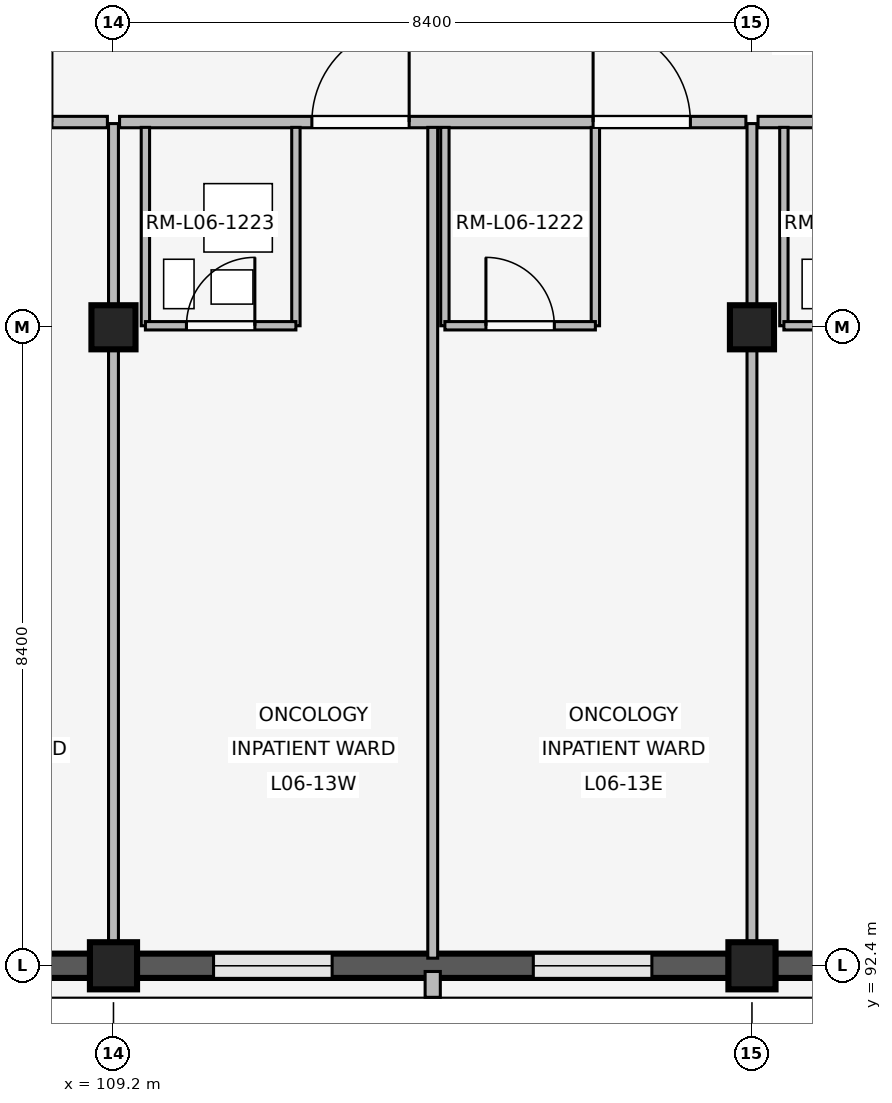
"""IFC4 building model, lengths in metres.
Left out: names, types, materials, properties, quantities, classifications, styles, units other than length and angle.
Written with IfcOpenShell. Run it as: python <this file> out.ifc"""

import sys

from ifc_helpers import new_model, si_unit, direction, frame, frame_2d, origin, origin_2d, place, context, subcontext, project, spatial, rectangle, extrude, element, fill, save


model = new_model("IFC4")
c1 = context("Model", 3, precision=1e-05, world=origin(), true_north=direction((0.0, 1.0)))
c2 = subcontext(c1, "Body", "Model", "MODEL_VIEW")
j1 = project(units=[si_unit("LENGTHUNIT", "METRE"), si_unit("PLANEANGLEUNIT", "RADIAN")], contexts=[c1])
p1 = place(None, origin())
s1 = spatial("IfcSite", under=j1, at=p1, CompositionType="ELEMENT")
p2 = place(p1, origin())
s2 = spatial("IfcBuilding", under=s1, at=p2, CompositionType="ELEMENT")
p3 = place(p2, frame((0.0, 0.0, 24.6)))
s3 = spatial("IfcBuildingStorey", under=s2, at=p3, CompositionType="ELEMENT", Elevation=24.6)
p4 = place(p3, frame((109.2, 92.4, 0.0), z_axis=(0.0, 0.0, 1.0), x_axis=(1.0, 0.0, 0.0)))
e1 = element("IfcColumn", 1, at=p4, inside=s3, PredefinedType="COLUMN", context=c2, shape_type="SweptSolid", body=[
    extrude(rectangle(XDim=0.62, YDim=0.62, at=origin_2d()), origin(), (0.0, 0.0, 1.0), 4.2),
])
p5 = place(p3, frame((109.2, 100.8, 0.0), z_axis=(0.0, 0.0, 1.0), x_axis=(1.0, 0.0, 0.0)))
e2 = element("IfcColumn", 2, at=p5, inside=s3, PredefinedType="COLUMN", context=c2, shape_type="SweptSolid", body=[
    extrude(rectangle(XDim=0.58, YDim=0.58, at=origin_2d()), origin(), (0.0, 0.0, 1.0), 4.2),
])
p6 = place(p3, frame((117.6, 92.4, 0.0), z_axis=(0.0, 0.0, 1.0), x_axis=(1.0, 0.0, 0.0)))
e3 = element("IfcColumn", 3, at=p6, inside=s3, PredefinedType="COLUMN", context=c2, shape_type="SweptSolid", body=[
    extrude(rectangle(XDim=0.62, YDim=0.62, at=origin_2d()), origin(), (0.0, 0.0, 1.0), 4.2),
])
p7 = place(p3, frame((117.6, 100.8, 0.0), z_axis=(0.0, 0.0, 1.0), x_axis=(1.0, 0.0, 0.0)))
e4 = element("IfcColumn", 4, at=p7, inside=s3, PredefinedType="COLUMN", context=c2, shape_type="SweptSolid", body=[
    extrude(rectangle(XDim=0.58, YDim=0.58, at=origin_2d()), origin(), (0.0, 0.0, 1.0), 4.2),
])
p8 = place(p3, frame((108.895, 92.4, 0.0), z_axis=(0.0, 0.0, 1.0), x_axis=(-1.0, 0.0, 0.0)))
e5 = element("IfcWall", 5, at=p8, inside=s3, PredefinedType="SOLIDWALL", context=c2, shape_type="SweptSolid", body=[
    extrude(rectangle(XDim=7.79, YDim=0.32, at=frame_2d((3.895, 0.0))), origin(), (0.0, 0.0, 1.0), 3.34),
])
p9 = place(p8, frame((1.102, 0.0, 0.85)))
e6 = element("IfcOpeningElement", 6, at=p9, cuts=e5, PredefinedType="OPENING", context=c2, shape_type="SweptSolid", body=[
    extrude(rectangle(XDim=1.38, YDim=1.5, at=frame_2d((0.69, 0.75))), frame((0.0, 0.17, 0.0), z_axis=(0.0, -1.0, 0.0), x_axis=(1.0, 0.0, 0.0)), (0.0, 0.0, 1.0), 0.34),
])
p10 = place(p8, frame((5.308, 0.0, 0.85)))
e7 = element("IfcOpeningElement", 7, at=p10, cuts=e5, PredefinedType="OPENING", context=c2, shape_type="SweptSolid", body=[
    extrude(rectangle(XDim=1.38, YDim=1.5, at=frame_2d((0.69, 0.75))), frame((0.0, 0.17, 0.0), z_axis=(0.0, -1.0, 0.0), x_axis=(1.0, 0.0, 0.0)), (0.0, 0.0, 1.0), 0.34),
])
p11 = place(p3, frame((117.295, 92.4, 0.0), z_axis=(0.0, 0.0, 1.0), x_axis=(-1.0, 0.0, 0.0)))
e8 = element("IfcWall", 8, at=p11, inside=s3, PredefinedType="SOLIDWALL", context=c2, shape_type="SweptSolid", body=[
    extrude(rectangle(XDim=7.79, YDim=0.32, at=frame_2d((3.895, 0.0))), origin(), (0.0, 0.0, 1.0), 3.34),
])
p12 = place(p11, frame((1.012, 0.0, 0.85)))
e9 = element("IfcOpeningElement", 9, at=p12, cuts=e8, PredefinedType="OPENING", context=c2, shape_type="SweptSolid", body=[
    extrude(rectangle(XDim=1.56, YDim=1.7, at=frame_2d((0.78, 0.85))), frame((0.0, 0.17, 0.0), z_axis=(0.0, -1.0, 0.0), x_axis=(1.0, 0.0, 0.0)), (0.0, 0.0, 1.0), 0.34),
])
p13 = place(p11, frame((5.218, 0.0, 0.85)))
e10 = element("IfcOpeningElement", 10, at=p13, cuts=e8, PredefinedType="OPENING", context=c2, shape_type="SweptSolid", body=[
    extrude(rectangle(XDim=1.56, YDim=1.7, at=frame_2d((0.78, 0.85))), frame((0.0, 0.17, 0.0), z_axis=(0.0, -1.0, 0.0), x_axis=(1.0, 0.0, 0.0)), (0.0, 0.0, 1.0), 0.34),
])
p14 = place(p3, frame((113.4, 92.325, 0.0), z_axis=(0.0, 0.0, 1.0), x_axis=(0.0, -1.0, 0.0)))
e11 = element("IfcWall", 11, at=p14, inside=s3, PredefinedType="ELEMENTEDWALL", context=c2, shape_type="SweptSolid", body=[
    extrude(rectangle(XDim=0.34, YDim=0.2, at=frame_2d((0.17, 0.0))), origin(), (0.0, 0.0, 1.0), 3.32),
])
p15 = place(p3, frame((125.695, 92.4, 0.0), z_axis=(0.0, 0.0, 1.0), x_axis=(-1.0, 0.0, 0.0)))
e12 = element("IfcWall", 12, at=p15, inside=s3, PredefinedType="SOLIDWALL", context=c2, shape_type="SweptSolid", body=[
    extrude(rectangle(XDim=7.79, YDim=0.32, at=frame_2d((3.895, 0.0))), origin(), (0.0, 0.0, 1.0), 3.34),
])
p16 = place(p15, frame((0.982, 0.0, 0.85)))
e13 = element("IfcOpeningElement", 13, at=p16, cuts=e12, PredefinedType="OPENING", context=c2, shape_type="SweptSolid", body=[
    extrude(rectangle(XDim=1.62, YDim=1.8, at=frame_2d((0.81, 0.9))), frame((0.0, 0.17, 0.0), z_axis=(0.0, -1.0, 0.0), x_axis=(1.0, 0.0, 0.0)), (0.0, 0.0, 1.0), 0.34),
])
p17 = place(p15, frame((5.188, 0.0, 0.85)))
e14 = element("IfcOpeningElement", 14, at=p17, cuts=e12, PredefinedType="OPENING", context=c2, shape_type="SweptSolid", body=[
    extrude(rectangle(XDim=1.62, YDim=1.8, at=frame_2d((0.81, 0.9))), frame((0.0, 0.17, 0.0), z_axis=(0.0, -1.0, 0.0), x_axis=(1.0, 0.0, 0.0)), (0.0, 0.0, 1.0), 0.34),
])
p18 = place(p3, frame((100.88, 103.5, 0.0), z_axis=(0.0, 0.0, 1.0), x_axis=(1.0, 0.0, 0.0)))
e15 = element("IfcWall", 15, at=p18, inside=s3, PredefinedType="PARTITIONING", context=c2, shape_type="SweptSolid", body=[
    extrude(rectangle(XDim=8.24, YDim=0.15, at=frame_2d((4.12, 0.0))), origin(), (0.0, 0.0, 1.0), 3.32),
])
p19 = place(p18, frame((2.53, 0.0, 0.0)))
e16 = element("IfcOpeningElement", 16, at=p19, cuts=e15, PredefinedType="OPENING", context=c2, shape_type="SweptSolid", body=[
    extrude(rectangle(XDim=1.28, YDim=2.2, at=frame_2d((0.64, 1.1))), frame((0.0, 0.085, 0.0), z_axis=(0.0, -1.0, 0.0), x_axis=(1.0, 0.0, 0.0)), (0.0, 0.0, 1.0), 0.17),
])
p20 = place(p18, frame((6.23, 0.0, 0.0)))
e17 = element("IfcOpeningElement", 17, at=p20, cuts=e15, PredefinedType="OPENING", context=c2, shape_type="SweptSolid", body=[
    extrude(rectangle(XDim=1.28, YDim=2.2, at=frame_2d((0.64, 1.1))), frame((0.0, 0.085, 0.0), z_axis=(0.0, -1.0, 0.0), x_axis=(1.0, 0.0, 0.0)), (0.0, 0.0, 1.0), 0.17),
])
p21 = place(p3, frame((109.2, 92.54, 0.0), z_axis=(0.0, 0.0, 1.0), x_axis=(0.0, 1.0, 0.0)))
e18 = element("IfcWall", 18, at=p21, inside=s3, PredefinedType="PARTITIONING", context=c2, shape_type="SweptSolid", body=[
    extrude(rectangle(XDim=10.94, YDim=0.13, at=frame_2d((5.47, 0.0))), origin(), (0.0, 0.0, 1.0), 3.32),
])
p22 = place(p3, frame((109.28, 103.5, 0.0), z_axis=(0.0, 0.0, 1.0), x_axis=(1.0, 0.0, 0.0)))
e19 = element("IfcWall", 19, at=p22, inside=s3, PredefinedType="PARTITIONING", context=c2, shape_type="SweptSolid", body=[
    extrude(rectangle(XDim=8.24, YDim=0.15, at=frame_2d((4.12, 0.0))), origin(), (0.0, 0.0, 1.0), 3.32),
])
p23 = place(p22, frame((2.53, 0.0, 0.0)))
e20 = element("IfcOpeningElement", 20, at=p23, cuts=e19, PredefinedType="OPENING", context=c2, shape_type="SweptSolid", body=[
    extrude(rectangle(XDim=1.28, YDim=2.2, at=frame_2d((0.64, 1.1))), frame((0.0, 0.085, 0.0), z_axis=(0.0, -1.0, 0.0), x_axis=(1.0, 0.0, 0.0)), (0.0, 0.0, 1.0), 0.17),
])
p24 = place(p22, frame((6.23, 0.0, 0.0)))
e21 = element("IfcOpeningElement", 21, at=p24, cuts=e19, PredefinedType="OPENING", context=c2, shape_type="SweptSolid", body=[
    extrude(rectangle(XDim=1.28, YDim=2.2, at=frame_2d((0.64, 1.1))), frame((0.0, 0.085, 0.0), z_axis=(0.0, -1.0, 0.0), x_axis=(1.0, 0.0, 0.0)), (0.0, 0.0, 1.0), 0.17),
])
p25 = place(p3, frame((113.4, 92.5, 0.0), z_axis=(0.0, 0.0, 1.0), x_axis=(0.0, 1.0, 0.0)))
e22 = element("IfcWall", 22, at=p25, inside=s3, PredefinedType="PARTITIONING", context=c2, shape_type="SweptSolid", body=[
    extrude(rectangle(XDim=10.93, YDim=0.13, at=frame_2d((5.465, 0.0))), origin(), (0.0, 0.0, 1.0), 3.32),
])
for number, where, z_axis, x_axis in (
    (23, (109.62, 100.82, 0.0), (0.0, 0.0, 1.0), (0.0, 1.0, 0.0)),
    (24, (111.6, 100.82, 0.0), (0.0, 0.0, 1.0), (0.0, 1.0, 0.0)),
):
    element("IfcWall", number, at=place(p3, frame(where, z_axis=z_axis, x_axis=x_axis)), inside=s3, PredefinedType="PARTITIONING", context=c2, shape_type="SweptSolid", body=[
        extrude(rectangle(XDim=2.61, YDim=0.11, at=frame_2d((1.305, 0.0))), origin(), (0.0, 0.0, 1.0), 3.32),
    ])
p26 = place(p3, frame((109.62, 100.82, 0.0), z_axis=(0.0, 0.0, 1.0), x_axis=(1.0, 0.0, 0.0)))
e25 = element("IfcWall", 25, at=p26, inside=s3, PredefinedType="PARTITIONING", context=c2, shape_type="SweptSolid", body=[
    extrude(rectangle(XDim=1.98, YDim=0.11, at=frame_2d((0.99, 0.0))), origin(), (0.0, 0.0, 1.0), 3.32),
])
p27 = place(p26, frame((0.54, 0.0, 0.0)))
e26 = element("IfcOpeningElement", 26, at=p27, cuts=e25, PredefinedType="OPENING", context=c2, shape_type="SweptSolid", body=[
    extrude(rectangle(XDim=0.9, YDim=2.1, at=frame_2d((0.45, 1.05))), frame((0.0, 0.065, 0.0), z_axis=(0.0, -1.0, 0.0), x_axis=(1.0, 0.0, 0.0)), (0.0, 0.0, 1.0), 0.13),
])
for number, where, z_axis, x_axis in (
    (27, (113.56, 100.82, 0.0), (0.0, 0.0, 1.0), (0.0, 1.0, 0.0)),
    (28, (115.54, 100.82, 0.0), (0.0, 0.0, 1.0), (0.0, 1.0, 0.0)),
):
    element("IfcWall", number, at=place(p3, frame(where, z_axis=z_axis, x_axis=x_axis)), inside=s3, PredefinedType="PARTITIONING", context=c2, shape_type="SweptSolid", body=[
        extrude(rectangle(XDim=2.61, YDim=0.11, at=frame_2d((1.305, 0.0))), origin(), (0.0, 0.0, 1.0), 3.32),
    ])
p28 = place(p3, frame((113.56, 100.82, 0.0), z_axis=(0.0, 0.0, 1.0), x_axis=(1.0, 0.0, 0.0)))
e29 = element("IfcWall", 29, at=p28, inside=s3, PredefinedType="PARTITIONING", context=c2, shape_type="SweptSolid", body=[
    extrude(rectangle(XDim=1.98, YDim=0.11, at=frame_2d((0.99, 0.0))), origin(), (0.0, 0.0, 1.0), 3.32),
])
p29 = place(p28, frame((0.54, 0.0, 0.0)))
e30 = element("IfcOpeningElement", 30, at=p29, cuts=e29, PredefinedType="OPENING", context=c2, shape_type="SweptSolid", body=[
    extrude(rectangle(XDim=0.9, YDim=2.1, at=frame_2d((0.45, 1.05))), frame((0.0, 0.065, 0.0), z_axis=(0.0, -1.0, 0.0), x_axis=(1.0, 0.0, 0.0)), (0.0, 0.0, 1.0), 0.13),
])
p30 = place(p3, frame((117.6, 92.54, 0.0), z_axis=(0.0, 0.0, 1.0), x_axis=(0.0, 1.0, 0.0)))
e31 = element("IfcWall", 31, at=p30, inside=s3, PredefinedType="PARTITIONING", context=c2, shape_type="SweptSolid", body=[
    extrude(rectangle(XDim=10.94, YDim=0.13, at=frame_2d((5.47, 0.0))), origin(), (0.0, 0.0, 1.0), 3.32),
])
p31 = place(p3, frame((117.68, 103.5, 0.0), z_axis=(0.0, 0.0, 1.0), x_axis=(1.0, 0.0, 0.0)))
e32 = element("IfcWall", 32, at=p31, inside=s3, PredefinedType="PARTITIONING", context=c2, shape_type="SweptSolid", body=[
    extrude(rectangle(XDim=8.24, YDim=0.15, at=frame_2d((4.12, 0.0))), origin(), (0.0, 0.0, 1.0), 3.32),
])
p32 = place(p31, frame((2.53, 0.0, 0.0)))
e33 = element("IfcOpeningElement", 33, at=p32, cuts=e32, PredefinedType="OPENING", context=c2, shape_type="SweptSolid", body=[
    extrude(rectangle(XDim=1.35, YDim=2.25, at=frame_2d((0.675, 1.125))), frame((0.0, 0.085, 0.0), z_axis=(0.0, -1.0, 0.0), x_axis=(1.0, 0.0, 0.0)), (0.0, 0.0, 1.0), 0.17),
])
p33 = place(p31, frame((6.23, 0.0, 0.0)))
e34 = element("IfcOpeningElement", 34, at=p33, cuts=e32, PredefinedType="OPENING", context=c2, shape_type="SweptSolid", body=[
    extrude(rectangle(XDim=1.35, YDim=2.25, at=frame_2d((0.675, 1.125))), frame((0.0, 0.085, 0.0), z_axis=(0.0, -1.0, 0.0), x_axis=(1.0, 0.0, 0.0)), (0.0, 0.0, 1.0), 0.17),
])
p34 = place(p3, frame((118.02, 100.82, 0.0), z_axis=(0.0, 0.0, 1.0), x_axis=(0.0, 1.0, 0.0)))
e35 = element("IfcWall", 35, at=p34, inside=s3, PredefinedType="PARTITIONING", context=c2, shape_type="SweptSolid", body=[
    extrude(rectangle(XDim=2.61, YDim=0.11, at=frame_2d((1.305, 0.0))), origin(), (0.0, 0.0, 1.0), 3.32),
])
p35 = place(p3, frame((118.02, 100.82, 0.0), z_axis=(0.0, 0.0, 1.0), x_axis=(1.0, 0.0, 0.0)))
e36 = element("IfcWall", 36, at=p35, inside=s3, PredefinedType="PARTITIONING", context=c2, shape_type="SweptSolid", body=[
    extrude(rectangle(XDim=1.98, YDim=0.11, at=frame_2d((0.99, 0.0))), origin(), (0.0, 0.0, 1.0), 3.32),
])
p36 = place(p35, frame((0.54, 0.0, 0.0)))
e37 = element("IfcOpeningElement", 37, at=p36, cuts=e36, PredefinedType="OPENING", context=c2, shape_type="SweptSolid", body=[
    extrude(rectangle(XDim=0.9, YDim=2.1, at=frame_2d((0.45, 1.05))), frame((0.0, 0.065, 0.0), z_axis=(0.0, -1.0, 0.0), x_axis=(1.0, 0.0, 0.0)), (0.0, 0.0, 1.0), 0.13),
])
p37 = place(p12, origin())
e38 = element("IfcWindow", 38, at=p37, inside=s3, PartitioningType="SINGLE_PANEL", PredefinedType="WINDOW", context=c2, shape_type="SweptSolid", body=[
    extrude(rectangle(XDim=1.56, YDim=1.7, at=frame_2d((0.78, 0.85))), frame((0.0, 0.03, 0.0), z_axis=(0.0, -1.0, 0.0), x_axis=(1.0, 0.0, 0.0)), (0.0, 0.0, 1.0), 0.06),
])
fill(e9, e38)
p38 = place(p13, origin())
e39 = element("IfcWindow", 39, at=p38, inside=s3, PartitioningType="SINGLE_PANEL", PredefinedType="WINDOW", context=c2, shape_type="SweptSolid", body=[
    extrude(rectangle(XDim=1.56, YDim=1.7, at=frame_2d((0.78, 0.85))), frame((0.0, 0.03, 0.0), z_axis=(0.0, -1.0, 0.0), x_axis=(1.0, 0.0, 0.0)), (0.0, 0.0, 1.0), 0.06),
])
fill(e10, e39)
p39 = place(p23, origin())
e40 = element("IfcDoor", 40, at=p39, inside=s3, OperationType="SINGLE_SWING_RIGHT", PredefinedType="DOOR", context=c2, shape_type="SweptSolid", body=[
    extrude(rectangle(XDim=1.28, YDim=2.2, at=frame_2d((0.64, 1.1))), frame((0.0, 0.025, 0.0), z_axis=(0.0, -1.0, 0.0), x_axis=(1.0, 0.0, 0.0)), (0.0, 0.0, 1.0), 0.05),
])
fill(e20, e40)
p40 = place(p24, origin())
e41 = element("IfcDoor", 41, at=p40, inside=s3, OperationType="SINGLE_SWING_LEFT", PredefinedType="DOOR", context=c2, shape_type="SweptSolid", body=[
    extrude(rectangle(XDim=1.28, YDim=2.2, at=frame_2d((0.64, 1.1))), frame((0.0, 0.025, 0.0), z_axis=(0.0, -1.0, 0.0), x_axis=(1.0, 0.0, 0.0)), (0.0, 0.0, 1.0), 0.05),
])
fill(e21, e41)
p41 = place(p27, origin())
e42 = element("IfcDoor", 42, at=p41, inside=s3, OperationType="SINGLE_SWING_RIGHT", PredefinedType="DOOR", context=c2, shape_type="SweptSolid", body=[
    extrude(rectangle(XDim=0.9, YDim=2.1, at=frame_2d((0.45, 1.05))), frame((0.0, 0.025, 0.0), z_axis=(0.0, -1.0, 0.0), x_axis=(1.0, 0.0, 0.0)), (0.0, 0.0, 1.0), 0.05),
])
fill(e26, e42)
p42 = place(p29, origin())
e43 = element("IfcDoor", 43, at=p42, inside=s3, OperationType="SINGLE_SWING_LEFT", PredefinedType="DOOR", context=c2, shape_type="SweptSolid", body=[
    extrude(rectangle(XDim=0.9, YDim=2.1, at=frame_2d((0.45, 1.05))), frame((0.0, 0.025, 0.0), z_axis=(0.0, -1.0, 0.0), x_axis=(1.0, 0.0, 0.0)), (0.0, 0.0, 1.0), 0.05),
])
fill(e30, e43)
save(model, sys.argv[1])
